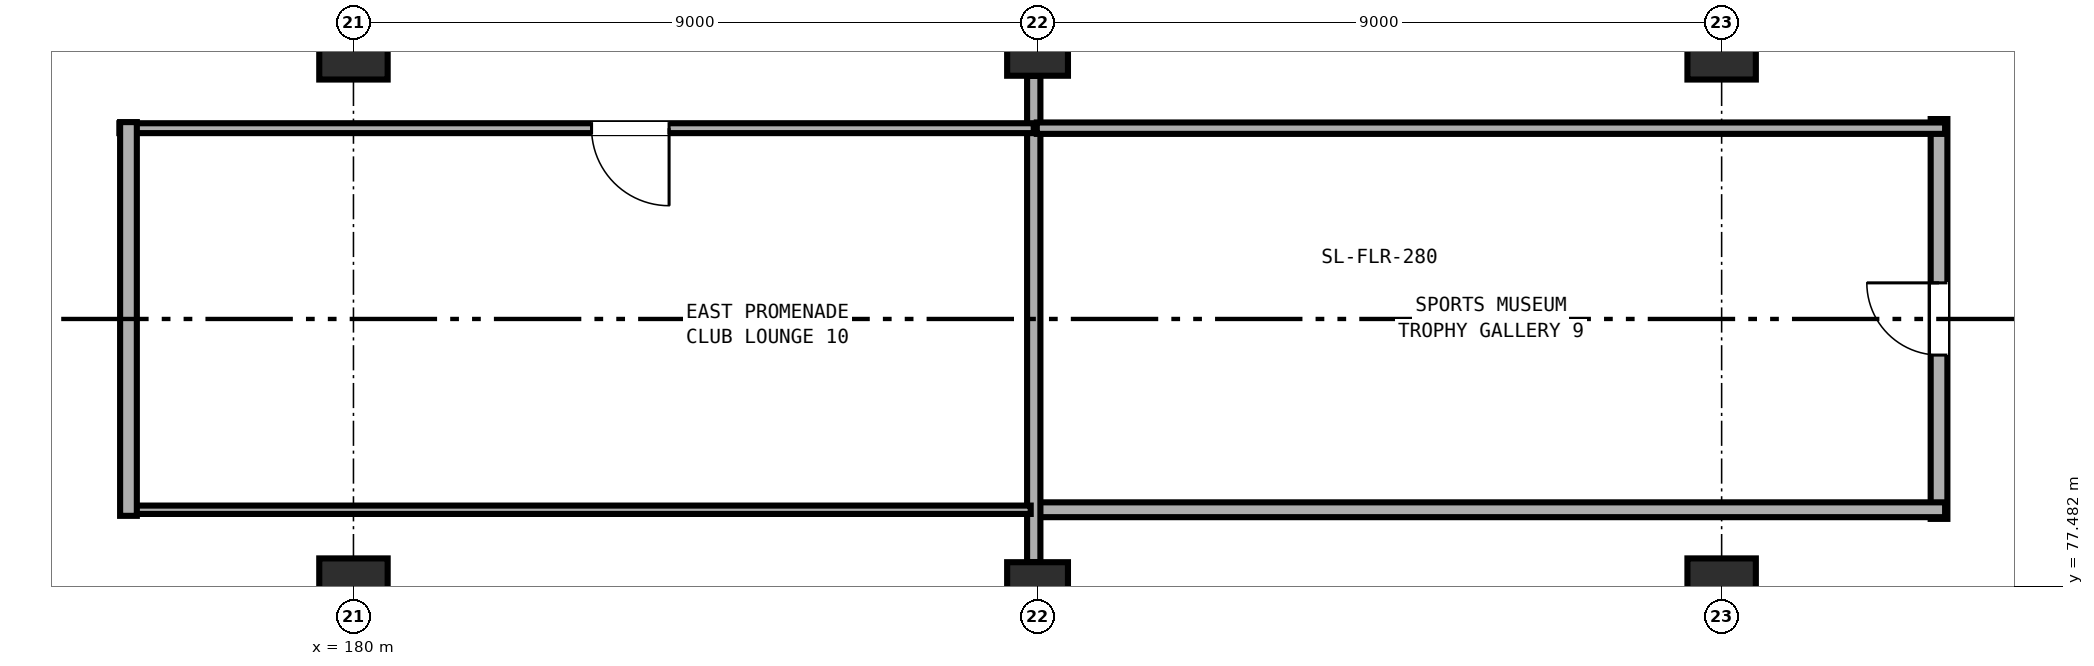
"""IFC4 building model, lengths in metres.
Left out: names, types, materials, properties, quantities, classifications, styles, units other than length and angle.
Written with IfcOpenShell. Run it as: python <this file> out.ifc"""

import sys

from ifc_helpers import new_model, si_unit, direction, frame, frame_2d, origin, origin_2d, place, context, subcontext, project, spatial, rectangle, extrude, element, fill, save


model = new_model("IFC4")
c1 = context("Model", 3, precision=1e-05, world=origin(), true_north=direction((0.0, 1.0)))
c2 = subcontext(c1, "Body", "Model", "MODEL_VIEW")
j1 = project(units=[si_unit("LENGTHUNIT", "METRE"), si_unit("PLANEANGLEUNIT", "RADIAN")], contexts=[c1])
p1 = place(None, origin())
s1 = spatial("IfcSite", under=j1, at=p1, CompositionType="ELEMENT")
p2 = place(p1, origin())
s2 = spatial("IfcBuilding", under=s1, at=p2, CompositionType="ELEMENT")
p3 = place(p2, frame((0.0, 0.0, 9.6)))
s3 = spatial("IfcBuildingStorey", under=s2, at=p3, CompositionType="ELEMENT", Elevation=9.6)
for number, where, z_axis, x_axis in (
    (1, (180.0, 77.4, 0.0), (0.0, 0.0, 1.0), (1.0, 0.0, 0.0)),
    (2, (180.0, 84.6, 0.0), (0.0, 0.0, 1.0), (1.0, 0.0, 0.0)),
):
    element("IfcColumn", number, at=place(p3, frame(where, z_axis=z_axis, x_axis=x_axis)), inside=s3, PredefinedType="COLUMN", context=c2, shape_type="SweptSolid", body=[
        extrude(rectangle(XDim=0.9, YDim=0.9, at=origin_2d()), origin(), (0.0, 0.0, 1.0), 4.8),
    ])
for number, where, z_axis, x_axis in (
    (3, (189.0, 77.4, 0.0), (0.0, 0.0, 1.0), (1.0, 0.0, 0.0)),
    (4, (189.0, 84.6, 0.0), (0.0, 0.0, 1.0), (1.0, 0.0, 0.0)),
):
    element("IfcColumn", number, at=place(p3, frame(where, z_axis=z_axis, x_axis=x_axis)), inside=s3, PredefinedType="COLUMN", context=c2, shape_type="SweptSolid", body=[
        extrude(rectangle(XDim=0.8, YDim=0.8, at=origin_2d()), origin(), (0.0, 0.0, 1.0), 4.8),
    ])
for number, where, z_axis, x_axis in (
    (5, (198.0, 77.4, 0.0), (0.0, 0.0, 1.0), (1.0, 0.0, 0.0)),
    (6, (198.0, 84.6, 0.0), (0.0, 0.0, 1.0), (1.0, 0.0, 0.0)),
):
    element("IfcColumn", number, at=place(p3, frame(where, z_axis=z_axis, x_axis=x_axis)), inside=s3, PredefinedType="COLUMN", context=c2, shape_type="SweptSolid", body=[
        extrude(rectangle(XDim=0.9, YDim=0.9, at=origin_2d()), origin(), (0.0, 0.0, 1.0), 4.8),
    ])
p4 = place(p3, frame((200.86, 78.37, 0.0), z_axis=(0.0, 0.0, 1.0), x_axis=(0.0, 1.0, 0.0)))
e7 = element("IfcWall", 7, at=p4, inside=s3, PredefinedType="PARTITIONING", context=c2, shape_type="SweptSolid", body=[
    extrude(rectangle(XDim=5.26, YDim=0.22, at=frame_2d((2.63, 0.0))), origin(), (0.0, 0.0, 1.0), 3.56),
])
p5 = place(p4, frame((2.155, 0.0, 0.0)))
e8 = element("IfcOpeningElement", 8, at=p5, cuts=e7, PredefinedType="OPENING", context=c2, shape_type="SweptSolid", body=[
    extrude(rectangle(XDim=0.95, YDim=2.18, at=frame_2d((0.475, 1.09))), frame((0.0, 0.12, 0.0), z_axis=(0.0, -1.0, 0.0), x_axis=(1.0, 0.0, 0.0)), (0.0, 0.0, 1.0), 0.24),
])
p6 = place(p3, frame((200.94, 78.49, 0.0), z_axis=(0.0, 0.0, 1.0), x_axis=(-1.0, 0.0, 0.0)))
e9 = element("IfcWall", 9, at=p6, inside=s3, PredefinedType="PARTITIONING", context=c2, shape_type="SweptSolid", body=[
    extrude(rectangle(XDim=11.95, YDim=0.195, at=frame_2d((5.975, 0.0))), origin(), (0.0, 0.0, 1.0), 3.56),
])
p7 = place(p3, frame((188.95, 77.802, 0.0), z_axis=(0.0, 0.0, 1.0), x_axis=(0.0, 1.0, 0.0)))
e10 = element("IfcWall", 10, at=p7, inside=s3, PredefinedType="PARTITIONING", context=c2, shape_type="SweptSolid", body=[
    extrude(rectangle(XDim=6.396, YDim=0.175, at=frame_2d((3.198, 0.0))), origin(), (0.0, 0.0, 1.0), 3.56),
])
p8 = place(p3, frame((188.99, 83.51, 0.0), z_axis=(0.0, 0.0, 1.0), x_axis=(1.0, 0.0, 0.0)))
e11 = element("IfcWall", 11, at=p8, inside=s3, PredefinedType="PARTITIONING", context=c2, shape_type="SweptSolid", body=[
    extrude(rectangle(XDim=11.95, YDim=0.15, at=frame_2d((5.975, 0.0))), origin(), (0.0, 0.0, 1.0), 3.56),
])
p9 = place(p3, frame((188.95, 83.51, 0.0), z_axis=(0.0, 0.0, 1.0), x_axis=(-1.0, 0.0, 0.0)))
e12 = element("IfcWall", 12, at=p9, inside=s3, PredefinedType="PARTITIONING", context=c2, shape_type="SweptSolid", body=[
    extrude(rectangle(XDim=12.03, YDim=0.13, at=frame_2d((6.015, 0.0))), origin(), (0.0, 0.0, 1.0), 3.56),
])
p10 = place(p9, frame((4.798, 0.0, 0.0)))
e13 = element("IfcOpeningElement", 13, at=p10, cuts=e12, PredefinedType="OPENING", context=c2, shape_type="SweptSolid", body=[
    extrude(rectangle(XDim=1.02, YDim=2.16, at=frame_2d((0.51, 1.08))), frame((0.0, 0.075, 0.0), z_axis=(0.0, -1.0, 0.0), x_axis=(1.0, 0.0, 0.0)), (0.0, 0.0, 1.0), 0.15),
])
p11 = place(p3, frame((188.91, 78.49, 0.0), z_axis=(0.0, 0.0, 1.0), x_axis=(-1.0, 0.0, 0.0)))
e14 = element("IfcWall", 14, at=p11, inside=s3, PredefinedType="PARTITIONING", context=c2, shape_type="SweptSolid", body=[
    extrude(rectangle(XDim=11.95, YDim=0.11, at=frame_2d((5.975, 0.0))), origin(), (0.0, 0.0, 1.0), 3.56),
])
p12 = place(p3, frame((177.04, 78.41, 0.0), z_axis=(0.0, 0.0, 1.0), x_axis=(0.0, 1.0, 0.0)))
e15 = element("IfcWall", 15, at=p12, inside=s3, PredefinedType="PARTITIONING", context=c2, shape_type="SweptSolid", body=[
    extrude(rectangle(XDim=5.18, YDim=0.22, at=frame_2d((2.59, 0.0))), origin(), (0.0, 0.0, 1.0), 3.56),
])
p13 = place(p5, origin())
e16 = element("IfcDoor", 16, at=p13, inside=s3, OperationType="SINGLE_SWING_RIGHT", PredefinedType="DOOR", context=c2, shape_type="SweptSolid", body=[
    extrude(rectangle(XDim=0.95, YDim=2.18, at=frame_2d((0.475, 1.09))), frame((0.0, 0.025, 0.0), z_axis=(0.0, -1.0, 0.0), x_axis=(1.0, 0.0, 0.0)), (0.0, 0.0, 1.0), 0.05),
])
fill(e8, e16)
p14 = place(p10, origin())
e17 = element("IfcDoor", 17, at=p14, inside=s3, OperationType="SINGLE_SWING_LEFT", PredefinedType="DOOR", context=c2, shape_type="SweptSolid", body=[
    extrude(rectangle(XDim=1.02, YDim=2.16, at=frame_2d((0.51, 1.08))), frame((0.0, 0.025, 0.0), z_axis=(0.0, -1.0, 0.0), x_axis=(1.0, 0.0, 0.0)), (0.0, 0.0, 1.0), 0.05),
])
fill(e13, e17)
save(model, sys.argv[1])
